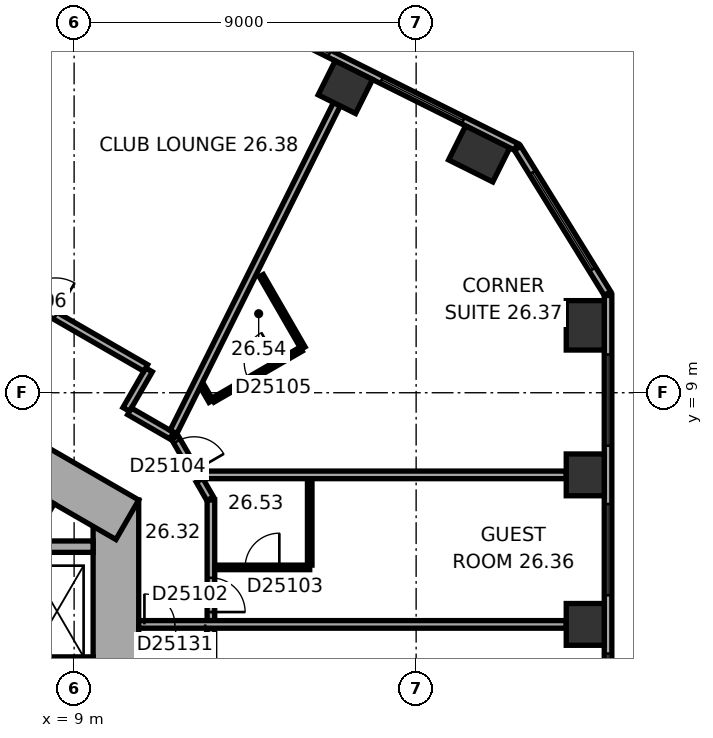
"""IFC4 building model, lengths in metres.
Left out: names, types, materials, properties, quantities, classifications, styles, units other than length and angle.
Written with IfcOpenShell. Run it as: python <this file> out.ifc"""

import sys

from ifc_helpers import new_model, si_unit, direction, frame, frame_2d, origin, origin_2d, place, context, subcontext, project, spatial, rectangle, extrude, element, fill, save


model = new_model("IFC4")
c1 = context("Model", 3, precision=1e-05, world=origin(), true_north=direction((0.0, 1.0)))
c2 = subcontext(c1, "Body", "Model", "MODEL_VIEW")
j1 = project(units=[si_unit("LENGTHUNIT", "METRE"), si_unit("PLANEANGLEUNIT", "RADIAN")], contexts=[c1])
p1 = place(None, origin())
s1 = spatial("IfcSite", under=j1, at=p1, CompositionType="ELEMENT")
p2 = place(p1, origin())
s2 = spatial("IfcBuilding", under=s1, at=p2, CompositionType="ELEMENT")
p3 = place(p2, frame((0.0, 0.0, 110.0)))
s3 = spatial("IfcBuildingStorey", under=s2, at=p3, CompositionType="ELEMENT", Elevation=110.0)
for number, where, z_axis, x_axis in (
    (1, (22.45, 2.905, 0.0), (0.0, 0.0, 1.0), (0.0, 1.0, 0.0)),
    (2, (22.45, 6.839, 0.0), (0.0, 0.0, 1.0), (0.0, 1.0, 0.0)),
):
    element("IfcColumn", number, at=place(p3, frame(where, z_axis=z_axis, x_axis=x_axis)), inside=s3, PredefinedType="COLUMN", context=c2, shape_type="SweptSolid", body=[
        extrude(rectangle(XDim=1.1, YDim=1.0, at=origin_2d()), origin(), (0.0, 0.0, 1.0), 3.3),
    ])
for number, where, z_axis, x_axis in (
    (3, (22.45, 10.774, 0.0), (0.0, 0.0, 1.0), (0.0, 1.0, 0.0)),
    (4, (19.659, 15.284, 0.0), (0.0, 0.0, 1.0), (-0.895, 0.446, 0.0)),
):
    element("IfcColumn", number, at=place(p3, frame(where, z_axis=z_axis, x_axis=x_axis)), inside=s3, PredefinedType="COLUMN", context=c2, shape_type="SweptSolid", body=[
        extrude(rectangle(XDim=1.3, YDim=1.0, at=origin_2d()), origin(), (0.0, 0.0, 1.0), 3.3),
    ])
p4 = place(p3, frame((16.138, 17.04, 0.0), z_axis=(0.0, 0.0, 1.0), x_axis=(-0.894934361602, 0.44619781311, 0.0)))
e5 = element("IfcColumn", 5, at=p4, inside=s3, PredefinedType="COLUMN", context=c2, shape_type="SweptSolid", body=[
    extrude(rectangle(XDim=1.1, YDim=1.0, at=origin_2d()), origin(), (0.0, 0.0, 1.0), 3.3),
])
p5 = place(p3, frame((10.1, -6.177, 0.0), z_axis=(0.0, 0.0, 1.0), x_axis=(0.0, 1.0, 0.0)))
e6 = element("IfcWall", 6, at=p5, inside=s3, PredefinedType="SHEAR", context=c2, shape_type="SweptSolid", body=[
    extrude(rectangle(XDim=12.355, YDim=1.2, at=frame_2d((6.177, 0.0))), origin(), (0.0, 0.0, 1.0), 3.3),
])
p6 = place(p5, frame((6.378, 0.0, 0.0)))
e7 = element("IfcOpeningElement", 7, at=p6, cuts=e6, PredefinedType="OPENING", context=c2, shape_type="SweptSolid", body=[
    extrude(rectangle(XDim=1.5, YDim=2.1, at=frame_2d((0.75, 1.05))), frame((0.0, 0.61, 0.0), z_axis=(0.0, -1.0, 0.0), x_axis=(1.0, 0.0, 0.0)), (0.0, 0.0, 1.0), 1.22),
])
p7 = place(p5, frame((1.828, 0.0, 0.0)))
e8 = element("IfcOpeningElement", 8, at=p7, cuts=e6, PredefinedType="OPENING", context=c2, shape_type="SweptSolid", body=[
    extrude(rectangle(XDim=1.1, YDim=2.1, at=frame_2d((0.55, 1.05))), frame((0.0, 0.61, 0.0), z_axis=(0.0, -1.0, 0.0), x_axis=(1.0, 0.0, 0.0)), (0.0, 0.0, 1.0), 1.22),
])
p8 = place(p5, frame((4.427, 0.0, 0.0)))
e9 = element("IfcOpeningElement", 9, at=p8, cuts=e6, PredefinedType="OPENING", context=c2, shape_type="SweptSolid", body=[
    extrude(rectangle(XDim=1.1, YDim=2.1, at=frame_2d((0.55, 1.05))), frame((0.0, 0.61, 0.0), z_axis=(0.0, -1.0, 0.0), x_axis=(1.0, 0.0, 0.0)), (0.0, 0.0, 1.0), 1.22),
])
p9 = place(p3, frame((10.4, 5.658, 0.0), z_axis=(0.0, 0.0, 1.0), x_axis=(-0.866021384402, 0.500006961711, 0.0)))
e10 = element("IfcWall", 10, at=p9, inside=s3, PredefinedType="SHEAR", context=c2, shape_type="SweptSolid", body=[
    extrude(rectangle(XDim=12.355, YDim=1.2, at=frame_2d((6.178, 0.0))), origin(), (0.0, 0.0, 1.0), 3.3),
])
p10 = place(p9, frame((2.728, 0.0, 0.0)))
e11 = element("IfcOpeningElement", 11, at=p10, cuts=e10, PredefinedType="OPENING", context=c2, shape_type="SweptSolid", body=[
    extrude(rectangle(XDim=1.1, YDim=2.1, at=frame_2d((0.55, 1.05))), frame((0.0, 0.61, 0.0), z_axis=(0.0, -1.0, 0.0), x_axis=(1.0, 0.0, 0.0)), (0.0, 0.0, 1.0), 1.22),
])
p11 = place(p9, frame((5.328, 0.0, 0.0)))
e12 = element("IfcOpeningElement", 12, at=p11, cuts=e10, PredefinedType="OPENING", context=c2, shape_type="SweptSolid", body=[
    extrude(rectangle(XDim=1.1, YDim=2.1, at=frame_2d((0.55, 1.05))), frame((0.0, 0.61, 0.0), z_axis=(0.0, -1.0, 0.0), x_axis=(1.0, 0.0, 0.0)), (0.0, 0.0, 1.0), 1.22),
])
p12 = place(p9, frame((7.928, 0.0, 0.0)))
e13 = element("IfcOpeningElement", 13, at=p12, cuts=e10, PredefinedType="OPENING", context=c2, shape_type="SweptSolid", body=[
    extrude(rectangle(XDim=1.1, YDim=2.1, at=frame_2d((0.55, 1.05))), frame((0.0, 0.61, 0.0), z_axis=(0.0, -1.0, 0.0), x_axis=(1.0, 0.0, 0.0)), (0.0, 0.0, 1.0), 1.22),
])
p13 = place(p3, frame((23.05, -9.687, 0.0), z_axis=(0.0, 0.0, 1.0), x_axis=(0.0, 1.0, 0.0)))
e14 = element("IfcWall", 14, at=p13, inside=s3, PredefinedType="STANDARD", context=c2, shape_type="SweptSolid", body=[
    extrude(rectangle(XDim=21.246, YDim=0.2, at=frame_2d((10.623, 0.0))), origin(), (0.0, 0.0, 1.0), 3.3),
])
p14 = place(p13, frame((1.555, 0.0, 0.8)))
e15 = element("IfcOpeningElement", 15, at=p14, cuts=e14, PredefinedType="OPENING", context=c2, shape_type="SweptSolid", body=[
    extrude(rectangle(XDim=2.4, YDim=1.7, at=frame_2d((1.2, 0.85))), frame((0.0, 0.11, 0.0), z_axis=(0.0, -1.0, 0.0), x_axis=(1.0, 0.0, 0.0)), (0.0, 0.0, 1.0), 0.22),
])
p15 = place(p13, frame((5.489, 0.0, 0.8)))
e16 = element("IfcOpeningElement", 16, at=p15, cuts=e14, PredefinedType="OPENING", context=c2, shape_type="SweptSolid", body=[
    extrude(rectangle(XDim=2.4, YDim=1.7, at=frame_2d((1.2, 0.85))), frame((0.0, 0.11, 0.0), z_axis=(0.0, -1.0, 0.0), x_axis=(1.0, 0.0, 0.0)), (0.0, 0.0, 1.0), 0.22),
])
p16 = place(p13, frame((9.424, 0.0, 0.8)))
e17 = element("IfcOpeningElement", 17, at=p16, cuts=e14, PredefinedType="OPENING", context=c2, shape_type="SweptSolid", body=[
    extrude(rectangle(XDim=2.4, YDim=1.7, at=frame_2d((1.2, 0.85))), frame((0.0, 0.11, 0.0), z_axis=(0.0, -1.0, 0.0), x_axis=(1.0, 0.0, 0.0)), (0.0, 0.0, 1.0), 0.22),
])
p17 = place(p13, frame((13.358, 0.0, 0.8)))
e18 = element("IfcOpeningElement", 18, at=p17, cuts=e14, PredefinedType="OPENING", context=c2, shape_type="SweptSolid", body=[
    extrude(rectangle(XDim=2.4, YDim=1.7, at=frame_2d((1.2, 0.85))), frame((0.0, 0.11, 0.0), z_axis=(0.0, -1.0, 0.0), x_axis=(1.0, 0.0, 0.0)), (0.0, 0.0, 1.0), 0.22),
])
p18 = place(p13, frame((17.293, 0.0, 0.8)))
e19 = element("IfcOpeningElement", 19, at=p18, cuts=e14, PredefinedType="OPENING", context=c2, shape_type="SweptSolid", body=[
    extrude(rectangle(XDim=2.4, YDim=1.7, at=frame_2d((1.2, 0.85))), frame((0.0, 0.11, 0.0), z_axis=(0.0, -1.0, 0.0), x_axis=(1.0, 0.0, 0.0)), (0.0, 0.0, 1.0), 0.22),
])
p19 = place(p3, frame((23.035, 11.612, 0.0), z_axis=(0.0, 0.0, 1.0), x_axis=(-0.526160091227, 0.850385535155, 0.0)))
e20 = element("IfcWall", 20, at=p19, inside=s3, PredefinedType="STANDARD", context=c2, shape_type="SweptSolid", body=[
    extrude(rectangle(XDim=4.494, YDim=0.2, at=frame_2d((2.247, 0.0))), origin(), (0.0, 0.0, 1.0), 3.3),
])
p20 = place(p19, frame((0.747, 0.0, 0.8)))
e21 = element("IfcOpeningElement", 21, at=p20, cuts=e20, PredefinedType="OPENING", context=c2, shape_type="SweptSolid", body=[
    extrude(rectangle(XDim=3.0, YDim=1.7, at=frame_2d((1.5, 0.85))), frame((0.0, 0.11, 0.0), z_axis=(0.0, -1.0, 0.0), x_axis=(1.0, 0.0, 0.0)), (0.0, 0.0, 1.0), 0.22),
])
p21 = place(p3, frame((20.63, 15.47, 0.0), z_axis=(0.0, 0.0, 1.0), x_axis=(-0.894934518609, 0.446197498203, 0.0)))
e22 = element("IfcWall", 22, at=p21, inside=s3, PredefinedType="STANDARD", context=c2, shape_type="SweptSolid", body=[
    extrude(rectangle(XDim=21.246, YDim=0.2, at=frame_2d((10.623, 0.0))), origin(), (0.0, 0.0, 1.0), 3.3),
])
p22 = place(p21, frame((1.553, 0.0, 0.8)))
e23 = element("IfcOpeningElement", 23, at=p22, cuts=e22, PredefinedType="OPENING", context=c2, shape_type="SweptSolid", body=[
    extrude(rectangle(XDim=2.4, YDim=1.7, at=frame_2d((1.2, 0.85))), frame((0.0, 0.11, 0.0), z_axis=(0.0, -1.0, 0.0), x_axis=(1.0, 0.0, 0.0)), (0.0, 0.0, 1.0), 0.22),
])
p23 = place(p21, frame((5.488, 0.0, 0.8)))
e24 = element("IfcOpeningElement", 24, at=p23, cuts=e22, PredefinedType="OPENING", context=c2, shape_type="SweptSolid", body=[
    extrude(rectangle(XDim=2.4, YDim=1.7, at=frame_2d((1.2, 0.85))), frame((0.0, 0.11, 0.0), z_axis=(0.0, -1.0, 0.0), x_axis=(1.0, 0.0, 0.0)), (0.0, 0.0, 1.0), 0.22),
])
p24 = place(p21, frame((9.422, 0.0, 0.8)))
e25 = element("IfcOpeningElement", 25, at=p24, cuts=e22, PredefinedType="OPENING", context=c2, shape_type="SweptSolid", body=[
    extrude(rectangle(XDim=2.4, YDim=1.7, at=frame_2d((1.2, 0.85))), frame((0.0, 0.11, 0.0), z_axis=(0.0, -1.0, 0.0), x_axis=(1.0, 0.0, 0.0)), (0.0, 0.0, 1.0), 0.22),
])
p25 = place(p21, frame((13.357, 0.0, 0.8)))
e26 = element("IfcOpeningElement", 26, at=p25, cuts=e22, PredefinedType="OPENING", context=c2, shape_type="SweptSolid", body=[
    extrude(rectangle(XDim=2.4, YDim=1.7, at=frame_2d((1.2, 0.85))), frame((0.0, 0.11, 0.0), z_axis=(0.0, -1.0, 0.0), x_axis=(1.0, 0.0, 0.0)), (0.0, 0.0, 1.0), 0.22),
])
p26 = place(p21, frame((17.292, 0.0, 0.8)))
e27 = element("IfcOpeningElement", 27, at=p26, cuts=e22, PredefinedType="OPENING", context=c2, shape_type="SweptSolid", body=[
    extrude(rectangle(XDim=2.4, YDim=1.7, at=frame_2d((1.2, 0.85))), frame((0.0, 0.11, 0.0), z_axis=(0.0, -1.0, 0.0), x_axis=(1.0, 0.0, 0.0)), (0.0, 0.0, 1.0), 0.22),
])
p27 = place(p3, frame((7.287, 4.222, 0.0), z_axis=(0.0, 0.0, 1.0), x_axis=(0.499946605688, 0.86605622881, 0.0)))
e28 = element("IfcWall", 28, at=p27, inside=s3, PredefinedType="PARTITIONING", context=c2, shape_type="SweptSolid", body=[
    extrude(rectangle(XDim=2.2, YDim=0.2, at=frame_2d((1.1, 0.0))), origin(), (0.0, 0.0, 1.0), 3.05),
])
p28 = place(p3, frame((7.3, 1.9, 0.0), z_axis=(0.0, 0.0, 1.0), x_axis=(1.0, 0.0, 0.0)))
e29 = element("IfcWall", 29, at=p28, inside=s3, PredefinedType="SHEAR", context=c2, shape_type="SweptSolid", body=[
    extrude(rectangle(XDim=2.2, YDim=0.3, at=frame_2d((1.1, 0.0))), origin(), (0.0, 0.0, 1.0), 3.05),
])
p29 = place(p28, frame((0.7, 0.0, 0.0)))
e30 = element("IfcOpeningElement", 30, at=p29, cuts=e29, PredefinedType="OPENING", context=c2, shape_type="SweptSolid", body=[
    extrude(rectangle(XDim=1.1, YDim=2.1, at=frame_2d((0.55, 1.05))), frame((0.0, 0.16, 0.0), z_axis=(0.0, -1.0, 0.0), x_axis=(1.0, 0.0, 0.0)), (0.0, 0.0, 1.0), 0.32),
])
p30 = place(p3, frame((7.3, 4.95, 0.0), z_axis=(0.0, 0.0, 1.0), x_axis=(1.0, 0.0, 0.0)))
e31 = element("IfcWall", 31, at=p30, inside=s3, PredefinedType="SHEAR", context=c2, shape_type="SweptSolid", body=[
    extrude(rectangle(XDim=2.2, YDim=0.3, at=frame_2d((1.1, 0.0))), origin(), (0.0, 0.0, 1.0), 3.05),
])
p31 = place(p3, frame((8.872, 20.104, 0.0), z_axis=(0.0, 0.0, 1.0), x_axis=(-0.446218378653, -0.894924107706, 0.0)))
e32 = element("IfcWall", 32, at=p31, inside=s3, PredefinedType="PARTITIONING", context=c2, shape_type="SweptSolid", body=[
    extrude(rectangle(XDim=7.95, YDim=0.2, at=frame_2d((3.975, 0.0))), origin(), (0.0, 0.0, 1.0), 3.05),
])
p32 = place(p3, frame((10.371, 8.561, 0.0), z_axis=(0.0, 0.0, 1.0), x_axis=(0.499986357472, 0.866033280158, 0.0)))
e33 = element("IfcWall", 33, at=p32, inside=s3, PredefinedType="PARTITIONING", context=c2, shape_type="SweptSolid", body=[
    extrude(rectangle(XDim=1.201, YDim=0.2, at=frame_2d((0.601, 0.0))), origin(), (0.0, 0.0, 1.0), 3.05),
])
p33 = place(p3, frame((10.885, 9.652, 0.0), z_axis=(0.0, 0.0, 1.0), x_axis=(-0.866033868542, 0.499985338323, 0.0)))
e34 = element("IfcWall", 34, at=p33, inside=s3, PredefinedType="PARTITIONING", context=c2, shape_type="SweptSolid", body=[
    extrude(rectangle(XDim=8.602, YDim=0.2, at=frame_2d((4.301, 0.0))), origin(), (0.0, 0.0, 1.0), 3.05),
])
p34 = place(p33, frame((2.739, 0.0, 0.0)))
e35 = element("IfcOpeningElement", 35, at=p34, cuts=e34, PredefinedType="OPENING", context=c2, shape_type="SweptSolid", body=[
    extrude(rectangle(XDim=1.0, YDim=2.1, at=frame_2d((0.5, 1.05))), frame((0.0, 0.11, 0.0), z_axis=(0.0, -1.0, 0.0), x_axis=(1.0, 0.0, 0.0)), (0.0, 0.0, 1.0), 0.22),
])
p35 = place(p3, frame((11.566, 7.871, 0.0), z_axis=(0.0, 0.0, 1.0), x_axis=(-0.866004557827, 0.500036104519, 0.0)))
e36 = element("IfcWall", 36, at=p35, inside=s3, PredefinedType="PARTITIONING", context=c2, shape_type="SweptSolid", body=[
    extrude(rectangle(XDim=1.28, YDim=0.2, at=frame_2d((0.64, 0.0))), origin(), (0.0, 0.0, 1.0), 3.05),
])
p36 = place(p3, frame((12.218, 6.839, 0.0), z_axis=(0.0, 0.0, 1.0), x_axis=(-0.500044870432, 0.865999496279, 0.0)))
e37 = element("IfcWall", 37, at=p36, inside=s3, PredefinedType="PARTITIONING", context=c2, shape_type="SweptSolid", body=[
    extrude(rectangle(XDim=1.136, YDim=0.2, at=frame_2d((0.568, 0.0))), origin(), (0.0, 0.0, 1.0), 3.05),
])
p37 = place(p36, frame((0.118, 0.0, 0.0)))
e38 = element("IfcOpeningElement", 38, at=p37, cuts=e37, PredefinedType="OPENING", context=c2, shape_type="SweptSolid", body=[
    extrude(rectangle(XDim=0.9, YDim=2.1, at=frame_2d((0.45, 1.05))), frame((0.0, 0.11, 0.0), z_axis=(0.0, -1.0, 0.0), x_axis=(1.0, 0.0, 0.0)), (0.0, 0.0, 1.0), 0.22),
])
p38 = place(p3, frame((12.58, 6.212, 0.0), z_axis=(0.0, 0.0, 1.0), x_axis=(-0.499936258447, 0.86606220186, 0.0)))
e39 = element("IfcWall", 39, at=p38, inside=s3, PredefinedType="PARTITIONING", context=c2, shape_type="SweptSolid", body=[
    extrude(rectangle(XDim=0.56, YDim=0.2, at=frame_2d((0.28, 0.0))), origin(), (0.0, 0.0, 1.0), 3.05),
])
p39 = place(p3, frame((12.6, 0.201, 0.0), z_axis=(0.0, 0.0, 1.0), x_axis=(0.0, 1.0, 0.0)))
e40 = element("IfcWall", 40, at=p39, inside=s3, PredefinedType="PARTITIONING", context=c2, shape_type="SweptSolid", body=[
    extrude(rectangle(XDim=2.604, YDim=0.2, at=frame_2d((1.302, 0.0))), origin(), (0.0, 0.0, 1.0), 3.05),
])
p40 = place(p3, frame((12.6, 3.004, 0.0), z_axis=(0.0, 0.0, 1.0), x_axis=(0.0, 1.0, 0.0)))
e41 = element("IfcWall", 41, at=p40, inside=s3, PredefinedType="PARTITIONING", context=c2, shape_type="SweptSolid", body=[
    extrude(rectangle(XDim=3.173, YDim=0.2, at=frame_2d((1.586, 0.0))), origin(), (0.0, 0.0, 1.0), 3.05),
])
p41 = place(p40, frame((0.225, 0.0, 0.0)))
e42 = element("IfcOpeningElement", 42, at=p41, cuts=e41, PredefinedType="OPENING", context=c2, shape_type="SweptSolid", body=[
    extrude(rectangle(XDim=0.9, YDim=2.1, at=frame_2d((0.45, 1.05))), frame((0.0, 0.11, 0.0), z_axis=(0.0, -1.0, 0.0), x_axis=(1.0, 0.0, 0.0)), (0.0, 0.0, 1.0), 0.22),
])
p42 = place(p3, frame((12.601, 8.776, 0.0), z_axis=(0.0, 0.0, 1.0), x_axis=(-0.500166486798, 0.865929261247, 0.0)))
e43 = element("IfcWall", 43, at=p42, inside=s3, PredefinedType="PARTITIONING", context=c2, shape_type="SweptSolid", body=[
    extrude(rectangle(XDim=0.476, YDim=0.12, at=frame_2d((0.238, 0.0))), origin(), (0.0, 0.0, 1.0), 3.05),
])
p43 = place(p3, frame((13.926, 12.081, 0.0), z_axis=(0.0, 0.0, 1.0), x_axis=(0.499994660107, -0.866028486751, 0.0)))
e44 = element("IfcWall", 44, at=p43, inside=s3, PredefinedType="PARTITIONING", context=c2, shape_type="SweptSolid", body=[
    extrude(rectangle(XDim=2.2, YDim=0.12, at=frame_2d((1.1, 0.0))), origin(), (0.0, 0.0, 1.0), 3.05),
])
p44 = place(p3, frame((14.974, 10.146, 0.0), z_axis=(0.0, 0.0, 1.0), x_axis=(-0.86599746015, -0.500048396672, 0.0)))
e45 = element("IfcWall", 45, at=p44, inside=s3, PredefinedType="PARTITIONING", context=c2, shape_type="SweptSolid", body=[
    extrude(rectangle(XDim=2.68, YDim=0.12, at=frame_2d((1.34, 0.0))), origin(), (0.0, 0.0, 1.0), 3.05),
])
p45 = place(p44, frame((0.69, 0.0, 0.0)))
e46 = element("IfcOpeningElement", 46, at=p45, cuts=e45, PredefinedType="OPENING", context=c2, shape_type="SweptSolid", body=[
    extrude(rectangle(XDim=0.9, YDim=2.1, at=frame_2d((0.45, 1.05))), frame((0.0, 0.07, 0.0), z_axis=(0.0, -1.0, 0.0), x_axis=(1.0, 0.0, 0.0)), (0.0, 0.0, 1.0), 0.14),
])
p46 = place(p3, frame((15.2, 4.405, 0.0), z_axis=(0.0, 0.0, 1.0), x_axis=(-1.0, 0.0, 0.0)))
e47 = element("IfcWall", 47, at=p46, inside=s3, PredefinedType="PARTITIONING", context=c2, shape_type="SweptSolid", body=[
    extrude(rectangle(XDim=2.5, YDim=0.12, at=frame_2d((1.25, 0.0))), origin(), (0.0, 0.0, 1.0), 3.05),
])
p47 = place(p46, frame((0.8, 0.0, 0.0)))
e48 = element("IfcOpeningElement", 48, at=p47, cuts=e47, PredefinedType="OPENING", context=c2, shape_type="SweptSolid", body=[
    extrude(rectangle(XDim=0.9, YDim=2.1, at=frame_2d((0.45, 1.05))), frame((0.0, 0.07, 0.0), z_axis=(0.0, -1.0, 0.0), x_axis=(1.0, 0.0, 0.0)), (0.0, 0.0, 1.0), 0.14),
])
p48 = place(p3, frame((15.2, 6.739, 0.0), z_axis=(0.0, 0.0, 1.0), x_axis=(0.0, -1.0, 0.0)))
e49 = element("IfcWall", 49, at=p48, inside=s3, PredefinedType="PARTITIONING", context=c2, shape_type="SweptSolid", body=[
    extrude(rectangle(XDim=2.274, YDim=0.12, at=frame_2d((1.137, 0.0))), origin(), (0.0, 0.0, 1.0), 3.05),
])
p49 = place(p3, frame((15.915, 16.592, 0.0), z_axis=(0.0, 0.0, 1.0), x_axis=(-0.446199736347, -0.894933402709, 0.0)))
e50 = element("IfcWall", 50, at=p49, inside=s3, PredefinedType="PARTITIONING", context=c2, shape_type="SweptSolid", body=[
    extrude(rectangle(XDim=9.635, YDim=0.2, at=frame_2d((4.817, 0.0))), origin(), (0.0, 0.0, 1.0), 3.05),
])
p50 = place(p3, frame((21.95, 2.905, 0.0), z_axis=(0.0, 0.0, 1.0), x_axis=(-1.0, 0.0, 0.0)))
e51 = element("IfcWall", 51, at=p50, inside=s3, PredefinedType="PARTITIONING", context=c2, shape_type="SweptSolid", body=[
    extrude(rectangle(XDim=11.25, YDim=0.2, at=frame_2d((5.625, 0.0))), origin(), (0.0, 0.0, 1.0), 3.05),
])
p51 = place(p50, frame((9.5, 0.0, 0.0)))
e52 = element("IfcOpeningElement", 52, at=p51, cuts=e51, PredefinedType="OPENING", context=c2, shape_type="SweptSolid", body=[
    extrude(rectangle(XDim=1.6, YDim=2.1, at=frame_2d((0.8, 1.05))), frame((0.0, 0.11, 0.0), z_axis=(0.0, -1.0, 0.0), x_axis=(1.0, 0.0, 0.0)), (0.0, 0.0, 1.0), 0.22),
])
p52 = place(p3, frame((21.95, 6.839, 0.0), z_axis=(0.0, 0.0, 1.0), x_axis=(-1.0, 0.0, 0.0)))
e53 = element("IfcWall", 53, at=p52, inside=s3, PredefinedType="PARTITIONING", context=c2, shape_type="SweptSolid", body=[
    extrude(rectangle(XDim=9.65, YDim=0.2, at=frame_2d((4.825, 0.0))), origin(), (0.0, 0.0, 1.0), 3.05),
])
p53 = place(p16, origin())
e54 = element("IfcWindow", 54, at=p53, inside=s3, PartitioningType="SINGLE_PANEL", PredefinedType="WINDOW", context=c2, shape_type="SweptSolid", body=[
    extrude(rectangle(XDim=2.4, YDim=1.7, at=frame_2d((1.2, 0.85))), frame((0.0, 0.03, 0.0), z_axis=(0.0, -1.0, 0.0), x_axis=(1.0, 0.0, 0.0)), (0.0, 0.0, 1.0), 0.06),
])
fill(e17, e54)
p54 = place(p17, origin())
e55 = element("IfcWindow", 55, at=p54, inside=s3, PartitioningType="SINGLE_PANEL", PredefinedType="WINDOW", context=c2, shape_type="SweptSolid", body=[
    extrude(rectangle(XDim=2.4, YDim=1.7, at=frame_2d((1.2, 0.85))), frame((0.0, 0.03, 0.0), z_axis=(0.0, -1.0, 0.0), x_axis=(1.0, 0.0, 0.0)), (0.0, 0.0, 1.0), 0.06),
])
fill(e18, e55)
p55 = place(p18, origin())
e56 = element("IfcWindow", 56, at=p55, inside=s3, PartitioningType="SINGLE_PANEL", PredefinedType="WINDOW", context=c2, shape_type="SweptSolid", body=[
    extrude(rectangle(XDim=2.4, YDim=1.7, at=frame_2d((1.2, 0.85))), frame((0.0, 0.03, 0.0), z_axis=(0.0, -1.0, 0.0), x_axis=(1.0, 0.0, 0.0)), (0.0, 0.0, 1.0), 0.06),
])
fill(e19, e56)
p56 = place(p20, origin())
e57 = element("IfcWindow", 57, at=p56, inside=s3, PartitioningType="SINGLE_PANEL", PredefinedType="WINDOW", context=c2, shape_type="SweptSolid", body=[
    extrude(rectangle(XDim=3.0, YDim=1.7, at=frame_2d((1.5, 0.85))), frame((0.0, 0.03, 0.0), z_axis=(0.0, -1.0, 0.0), x_axis=(1.0, 0.0, 0.0)), (0.0, 0.0, 1.0), 0.06),
])
fill(e21, e57)
p57 = place(p22, origin())
e58 = element("IfcWindow", 58, at=p57, inside=s3, PartitioningType="SINGLE_PANEL", PredefinedType="WINDOW", context=c2, shape_type="SweptSolid", body=[
    extrude(rectangle(XDim=2.4, YDim=1.7, at=frame_2d((1.2, 0.85))), frame((0.0, 0.03, 0.0), z_axis=(0.0, -1.0, 0.0), x_axis=(1.0, 0.0, 0.0)), (0.0, 0.0, 1.0), 0.06),
])
fill(e23, e58)
p58 = place(p23, origin())
e59 = element("IfcWindow", 59, at=p58, inside=s3, PartitioningType="SINGLE_PANEL", PredefinedType="WINDOW", context=c2, shape_type="SweptSolid", body=[
    extrude(rectangle(XDim=2.4, YDim=1.7, at=frame_2d((1.2, 0.85))), frame((0.0, 0.03, 0.0), z_axis=(0.0, -1.0, 0.0), x_axis=(1.0, 0.0, 0.0)), (0.0, 0.0, 1.0), 0.06),
])
fill(e24, e59)
p59 = place(p41, origin())
e60 = element("IfcDoor", 60, at=p59, inside=s3, OperationType="SINGLE_SWING_LEFT", PredefinedType="DOOR", context=c2, shape_type="SweptSolid", body=[
    extrude(rectangle(XDim=0.9, YDim=2.1, at=frame_2d((0.45, 1.05))), frame((0.0, 0.025, 0.0), z_axis=(0.0, -1.0, 0.0), x_axis=(1.0, 0.0, 0.0)), (0.0, 0.0, 1.0), 0.05),
])
fill(e42, e60)
p60 = place(p47, origin())
e61 = element("IfcDoor", 61, at=p60, inside=s3, OperationType="SINGLE_SWING_LEFT", PredefinedType="DOOR", context=c2, shape_type="SweptSolid", body=[
    extrude(rectangle(XDim=0.9, YDim=2.1, at=frame_2d((0.45, 1.05))), frame((0.0, 0.025, 0.0), z_axis=(0.0, -1.0, 0.0), x_axis=(1.0, 0.0, 0.0)), (0.0, 0.0, 1.0), 0.05),
])
fill(e48, e61)
p61 = place(p37, origin())
e62 = element("IfcDoor", 62, at=p61, inside=s3, OperationType="SINGLE_SWING_LEFT", PredefinedType="DOOR", context=c2, shape_type="SweptSolid", body=[
    extrude(rectangle(XDim=0.9, YDim=2.1, at=frame_2d((0.45, 1.05))), frame((0.0, 0.025, 0.0), z_axis=(0.0, -1.0, 0.0), x_axis=(1.0, 0.0, 0.0)), (0.0, 0.0, 1.0), 0.05),
])
fill(e38, e62)
p62 = place(p45, origin())
e63 = element("IfcDoor", 63, at=p62, inside=s3, OperationType="SINGLE_SWING_LEFT", PredefinedType="DOOR", context=c2, shape_type="SweptSolid", body=[
    extrude(rectangle(XDim=0.9, YDim=2.1, at=frame_2d((0.45, 1.05))), frame((0.0, 0.025, 0.0), z_axis=(0.0, -1.0, 0.0), x_axis=(1.0, 0.0, 0.0)), (0.0, 0.0, 1.0), 0.05),
])
fill(e46, e63)
p63 = place(p34, origin())
e64 = element("IfcDoor", 64, at=p63, inside=s3, OperationType="SINGLE_SWING_LEFT", PredefinedType="DOOR", context=c2, shape_type="SweptSolid", body=[
    extrude(rectangle(XDim=1.0, YDim=2.1, at=frame_2d((0.5, 1.05))), frame((0.0, 0.025, 0.0), z_axis=(0.0, -1.0, 0.0), x_axis=(1.0, 0.0, 0.0)), (0.0, 0.0, 1.0), 0.05),
])
fill(e35, e64)
p64 = place(p51, origin())
e65 = element("IfcDoor", 65, at=p64, inside=s3, OperationType="DOUBLE_DOOR_SINGLE_SWING", PredefinedType="DOOR", context=c2, shape_type="SweptSolid", body=[
    extrude(rectangle(XDim=1.6, YDim=2.1, at=frame_2d((0.8, 1.05))), frame((0.0, 0.025, 0.0), z_axis=(0.0, -1.0, 0.0), x_axis=(1.0, 0.0, 0.0)), (0.0, 0.0, 1.0), 0.05),
])
fill(e52, e65)
save(model, sys.argv[1])
